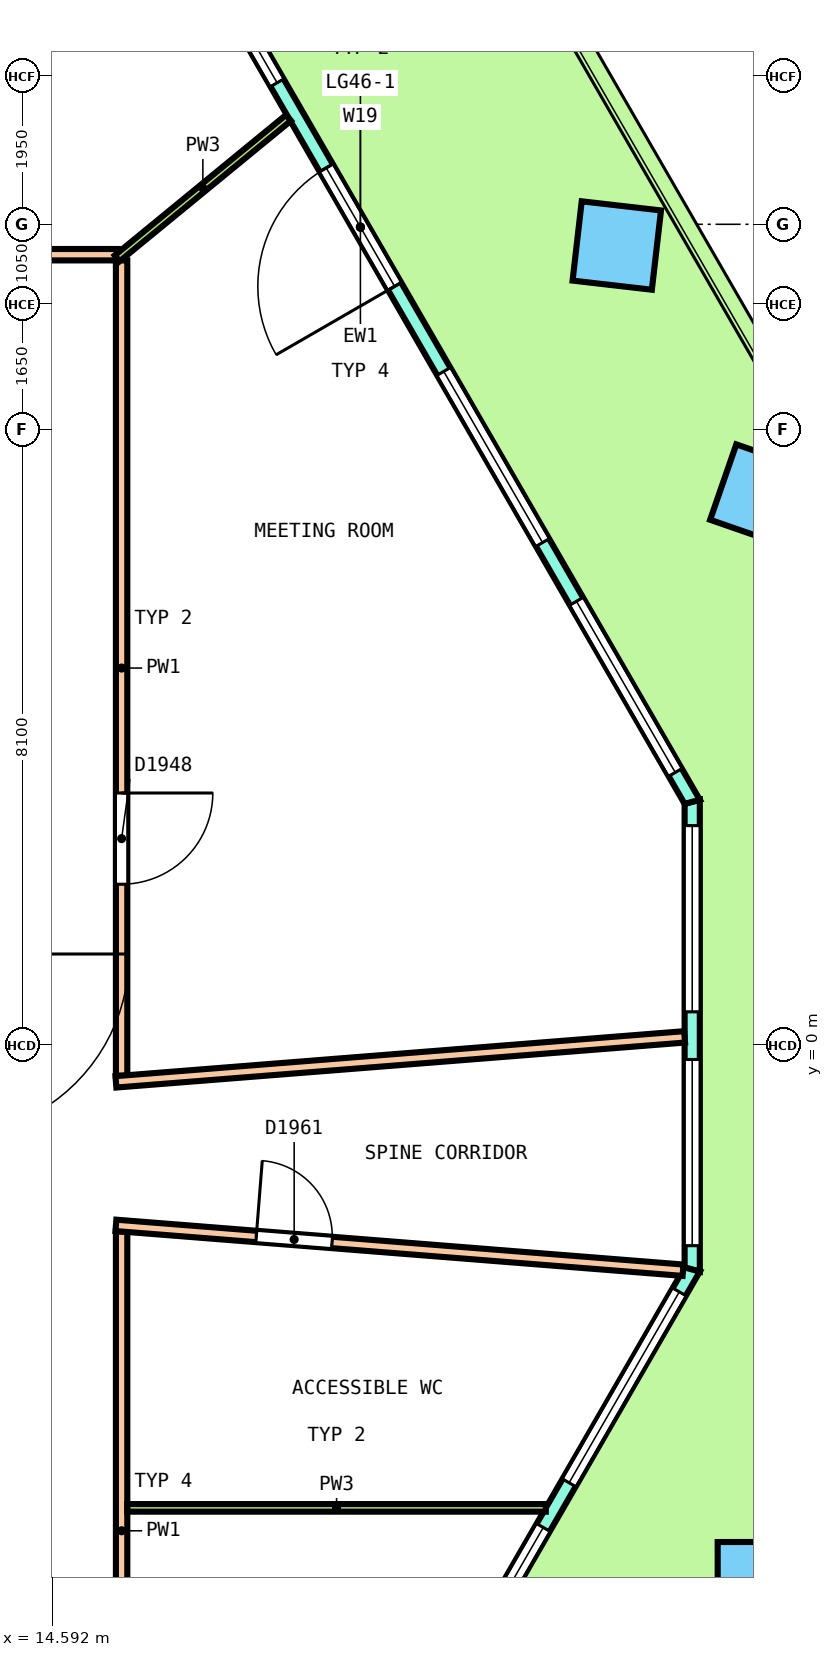
"""IFC4 building model, lengths in metres.
Left out: names, types, materials, properties, quantities, classifications, styles, units other than length and angle.
Written with IfcOpenShell. Run it as: python <this file> out.ifc"""

import sys

from ifc_helpers import new_model, si_unit, direction, frame, frame_2d, origin, origin_2d, place, context, subcontext, project, spatial, polyline, rectangle, outline, extrude, element, fill, save


model = new_model("IFC4")
c1 = context("Model", 3, precision=1e-05, world=origin(), true_north=direction((0.0, 1.0)))
c2 = subcontext(c1, "Body", "Model", "MODEL_VIEW")
j1 = project(units=[si_unit("LENGTHUNIT", "METRE"), si_unit("PLANEANGLEUNIT", "RADIAN")], contexts=[c1])
p1 = place(None, origin())
s1 = spatial("IfcSite", under=j1, at=p1, CompositionType="ELEMENT")
p2 = place(p1, origin())
s2 = spatial("IfcBuilding", under=s1, at=p2, CompositionType="ELEMENT")
p3 = place(p2, frame((0.0, 0.0, 215.4)))
s3 = spatial("IfcBuildingStorey", under=s2, at=p3, CompositionType="ELEMENT", Elevation=215.4)
p4 = place(p3, frame((23.911, 7.237, 0.0), z_axis=(0.021725676399, 0.025134936388, 0.999447962606), x_axis=(-0.500488924466, 0.86567442941, -0.010891223664)))
e1 = element("IfcColumn", 1, at=p4, inside=s3, PredefinedType="COLUMN", context=c2, shape_type="SweptSolid", body=[
    extrude(rectangle(XDim=1.05, YDim=1.05, at=origin_2d()), origin(), (0.0, 0.0, 1.0), 3.652),
])
p5 = place(p3, frame((22.015, 10.521, 0.0), z_axis=(0.025403639223, 0.018852174371, 0.999499500068), x_axis=(-0.500083888167, 0.865969385556, -0.003623268626)))
e2 = element("IfcColumn", 2, at=p5, inside=s3, PredefinedType="COLUMN", context=c2, shape_type="SweptSolid", body=[
    extrude(rectangle(XDim=1.05, YDim=1.05, at=origin_2d()), origin(), (0.0, 0.0, 1.0), 3.652),
])
p6 = place(p3, frame((23.867, -7.061, 0.0), z_axis=(0.010899694483, 0.018857140148, 0.999762774325), x_axis=(0.499728940012, 0.865907957958, -0.021780607409)))
e3 = element("IfcColumn", 3, at=p6, inside=s3, PredefinedType="COLUMN", context=c2, shape_type="SweptSolid", body=[
    extrude(rectangle(XDim=1.05, YDim=1.05, at=origin_2d()), origin(), (0.0, 0.0, 1.0), 3.651),
])
p7 = place(p3, frame((23.007, -2.951, 0.0), z_axis=(0.0, 0.0, 1.0), x_axis=(0.0, 1.0, 0.0)))
e4 = element("IfcWall", 4, at=p7, inside=s3, PredefinedType="SOLIDWALL", context=c2, shape_type="SweptSolid", body=[
    extrude(outline(polyline([(-0.027, -0.1), (1.008, -0.1), (2.042, -0.1), (3.076, -0.1), (4.111, -0.1), (5.145, -0.1), (6.18, -0.1), (6.126, 0.1), (5.109, 0.1), (4.093, 0.1), (3.076, 0.1), (2.06, 0.1), (1.043, 0.1), (0.027, 0.1), (-0.027, -0.1)])), origin(), (0.0, 0.0, 1.0), 3.7),
])
p8 = place(p7, frame((0.313, 0.0, 0.1)))
e5 = element("IfcOpeningElement", 5, at=p8, cuts=e4, PredefinedType="OPENING", context=c2, shape_type="SweptSolid", body=[
    extrude(rectangle(XDim=2.45, YDim=2.65, at=frame_2d((1.225, 1.325))), frame((0.0, 0.11, 0.0), z_axis=(0.0, -1.0, 0.0), x_axis=(1.0, 0.0, 0.0)), (0.0, 0.0, 1.0), 0.22),
])
p9 = place(p7, frame((3.39, 0.0, 0.1)))
e6 = element("IfcOpeningElement", 6, at=p9, cuts=e4, PredefinedType="OPENING", context=c2, shape_type="SweptSolid", body=[
    extrude(rectangle(XDim=2.45, YDim=2.65, at=frame_2d((1.225, 1.325))), frame((0.0, 0.11, 0.0), z_axis=(0.0, -1.0, 0.0), x_axis=(1.0, 0.0, 0.0)), (0.0, 0.0, 1.0), 0.22),
])
p10 = place(p3, frame((23.007, 3.202, 0.0), z_axis=(0.0, 0.0, 1.0), x_axis=(-0.500006883229, 0.866021429714, 0.0)))
e7 = element("IfcWall", 7, at=p10, inside=s3, PredefinedType="SOLIDWALL", context=c2, shape_type="SweptSolid", body=[
    extrude(outline(polyline([(-0.027, -0.1), (1.003, -0.1), (2.034, -0.1), (3.064, -0.1), (4.094, -0.1), (5.125, -0.1), (6.155, -0.1), (7.185, -0.1), (8.215, -0.1), (9.245, -0.1), (10.276, -0.1), (11.306, -0.1), (12.336, -0.1), (13.366, -0.1), (14.397, -0.1), (15.427, -0.1), (16.457, -0.1), (17.488, -0.1), (17.434, 0.1), (16.41, 0.1), (15.386, 0.1), (14.362, 0.1), (13.338, 0.1), (12.314, 0.1), (11.29, 0.1), (10.266, 0.1), (9.242, 0.1), (8.218, 0.1), (7.194, 0.1), (6.17, 0.1), (5.146, 0.1), (4.123, 0.1), (3.099, 0.1), (2.075, 0.1), (1.051, 0.1), (0.027, 0.1), (-0.027, -0.1)])), origin(), (0.0, 0.0, 1.0), 3.7),
])
p11 = place(p10, frame((0.446, 0.0, 0.1)))
e8 = element("IfcOpeningElement", 8, at=p11, cuts=e7, PredefinedType="OPENING", context=c2, shape_type="SweptSolid", body=[
    extrude(rectangle(XDim=2.6, YDim=2.65, at=frame_2d((1.3, 1.325))), frame((0.0, 0.11, 0.0), z_axis=(0.0, -1.0, 0.0), x_axis=(1.0, 0.0, 0.0)), (0.0, 0.0, 1.0), 0.22),
])
p12 = place(p10, frame((3.938, 0.0, 0.1)))
e9 = element("IfcOpeningElement", 9, at=p12, cuts=e7, PredefinedType="OPENING", context=c2, shape_type="SweptSolid", body=[
    extrude(rectangle(XDim=2.6, YDim=2.65, at=frame_2d((1.3, 1.325))), frame((0.0, 0.11, 0.0), z_axis=(0.0, -1.0, 0.0), x_axis=(1.0, 0.0, 0.0)), (0.0, 0.0, 1.0), 0.22),
])
p13 = place(p10, frame((7.83, 0.0, 0.0)))
e10 = element("IfcOpeningElement", 10, at=p13, cuts=e7, PredefinedType="OPENING", context=c2, shape_type="SweptSolid", body=[
    extrude(rectangle(XDim=1.8, YDim=2.4, at=frame_2d((0.9, 1.2))), frame((0.0, 0.11, 0.0), z_axis=(0.0, -1.0, 0.0), x_axis=(1.0, 0.0, 0.0)), (0.0, 0.0, 1.0), 0.22),
])
p14 = place(p10, frame((7.83, 0.0, 2.55)))
e11 = element("IfcOpeningElement", 11, at=p14, cuts=e7, PredefinedType="OPENING", context=c2, shape_type="SweptSolid", body=[
    extrude(rectangle(XDim=1.8, YDim=0.2, at=frame_2d((0.9, 0.1))), frame((0.0, 0.11, 0.0), z_axis=(0.0, -1.0, 0.0), x_axis=(1.0, 0.0, 0.0)), (0.0, 0.0, 1.0), 0.22),
])
p15 = place(p10, frame((10.923, 0.0, 0.1)))
e12 = element("IfcOpeningElement", 12, at=p15, cuts=e7, PredefinedType="OPENING", context=c2, shape_type="SweptSolid", body=[
    extrude(rectangle(XDim=2.6, YDim=2.65, at=frame_2d((1.3, 1.325))), frame((0.0, 0.11, 0.0), z_axis=(0.0, -1.0, 0.0), x_axis=(1.0, 0.0, 0.0)), (0.0, 0.0, 1.0), 0.22),
])
p16 = place(p10, frame((14.415, 0.0, 0.1)))
e13 = element("IfcOpeningElement", 13, at=p16, cuts=e7, PredefinedType="OPENING", context=c2, shape_type="SweptSolid", body=[
    extrude(rectangle(XDim=2.6, YDim=2.65, at=frame_2d((1.3, 1.325))), frame((0.0, 0.11, 0.0), z_axis=(0.0, -1.0, 0.0), x_axis=(1.0, 0.0, 0.0)), (0.0, 0.0, 1.0), 0.22),
])
p17 = place(p3, frame((14.059, -18.449, 0.0), z_axis=(0.0, 0.0, 1.0), x_axis=(0.500006652623, 0.866021562857, 0.0)))
e14 = element("IfcWall", 14, at=p17, inside=s3, PredefinedType="SOLIDWALL", context=c2, shape_type="SweptSolid", body=[
    extrude(outline(polyline([(-0.027, -0.1), (1.029, -0.1), (2.085, -0.1), (3.141, -0.1), (4.197, -0.1), (5.252, -0.1), (6.308, -0.1), (7.364, -0.1), (8.42, -0.1), (9.476, -0.1), (10.532, -0.1), (11.588, -0.1), (12.644, -0.1), (13.699, -0.1), (14.755, -0.1), (15.811, -0.1), (16.867, -0.1), (17.923, -0.1), (17.869, 0.1), (16.82, 0.1), (15.77, 0.1), (14.721, 0.1), (13.671, 0.1), (12.622, 0.1), (11.572, 0.1), (10.522, 0.1), (9.473, 0.1), (8.423, 0.1), (7.374, 0.1), (6.324, 0.1), (5.275, 0.1), (4.225, 0.1), (3.176, 0.1), (2.126, 0.1), (1.076, 0.1), (0.027, 0.1), (-0.027, -0.1)])), origin(), (0.0, 0.0, 1.0), 3.7),
])
p18 = place(p17, frame((0.34, 0.0, 0.1)))
e15 = element("IfcOpeningElement", 15, at=p18, cuts=e14, PredefinedType="OPENING", context=c2, shape_type="SweptSolid", body=[
    extrude(rectangle(XDim=2.9, YDim=2.65, at=frame_2d((1.45, 1.325))), frame((0.0, 0.11, 0.0), z_axis=(0.0, -1.0, 0.0), x_axis=(1.0, 0.0, 0.0)), (0.0, 0.0, 1.0), 0.22),
])
p19 = place(p17, frame((3.919, 0.0, 0.1)))
e16 = element("IfcOpeningElement", 16, at=p19, cuts=e14, PredefinedType="OPENING", context=c2, shape_type="SweptSolid", body=[
    extrude(rectangle(XDim=2.9, YDim=2.65, at=frame_2d((1.45, 1.325))), frame((0.0, 0.11, 0.0), z_axis=(0.0, -1.0, 0.0), x_axis=(1.0, 0.0, 0.0)), (0.0, 0.0, 1.0), 0.22),
])
p20 = place(p17, frame((8.048, 0.0, 0.0)))
e17 = element("IfcOpeningElement", 17, at=p20, cuts=e14, PredefinedType="OPENING", context=c2, shape_type="SweptSolid", body=[
    extrude(rectangle(XDim=1.8, YDim=2.4, at=frame_2d((0.9, 1.2))), frame((0.0, 0.11, 0.0), z_axis=(0.0, -1.0, 0.0), x_axis=(1.0, 0.0, 0.0)), (0.0, 0.0, 1.0), 0.22),
])
p21 = place(p17, frame((8.048, 0.0, 2.55)))
e18 = element("IfcOpeningElement", 18, at=p21, cuts=e14, PredefinedType="OPENING", context=c2, shape_type="SweptSolid", body=[
    extrude(rectangle(XDim=1.8, YDim=0.2, at=frame_2d((0.9, 0.1))), frame((0.0, 0.11, 0.0), z_axis=(0.0, -1.0, 0.0), x_axis=(1.0, 0.0, 0.0)), (0.0, 0.0, 1.0), 0.22),
])
p22 = place(p17, frame((11.077, 0.0, 0.1)))
e19 = element("IfcOpeningElement", 19, at=p22, cuts=e14, PredefinedType="OPENING", context=c2, shape_type="SweptSolid", body=[
    extrude(rectangle(XDim=2.9, YDim=2.65, at=frame_2d((1.45, 1.325))), frame((0.0, 0.11, 0.0), z_axis=(0.0, -1.0, 0.0), x_axis=(1.0, 0.0, 0.0)), (0.0, 0.0, 1.0), 0.22),
])
p23 = place(p17, frame((14.656, 0.0, 0.1)))
e20 = element("IfcOpeningElement", 20, at=p23, cuts=e14, PredefinedType="OPENING", context=c2, shape_type="SweptSolid", body=[
    extrude(rectangle(XDim=2.9, YDim=2.65, at=frame_2d((1.45, 1.325))), frame((0.0, 0.11, 0.0), z_axis=(0.0, -1.0, 0.0), x_axis=(1.0, 0.0, 0.0)), (0.0, 0.0, 1.0), 0.22),
])
p24 = place(p3, frame((15.5, -10.325, 0.0), z_axis=(0.0, 0.0, 1.0), x_axis=(0.0, 1.0, 0.0)))
e21 = element("IfcWall", 21, at=p24, inside=s3, PredefinedType="PARTITIONING", context=c2, shape_type="SweptSolid", body=[
    extrude(rectangle(XDim=7.874, YDim=0.15, at=frame_2d((3.937, 0.0))), origin(), (0.0, 0.0, 1.0), 2.8),
])
p25 = place(p24, frame((1.19, 0.0, 0.0)))
e22 = element("IfcOpeningElement", 22, at=p25, cuts=e21, PredefinedType="OPENING", context=c2, shape_type="SweptSolid", body=[
    extrude(rectangle(XDim=1.0, YDim=2.1, at=frame_2d((0.5, 1.05))), frame((0.0, 0.085, 0.0), z_axis=(0.0, -1.0, 0.0), x_axis=(1.0, 0.0, 0.0)), (0.0, 0.0, 1.0), 0.17),
])
p26 = place(p3, frame((15.5, -0.401, 0.0), z_axis=(0.0, 0.0, 1.0), x_axis=(0.0, 1.0, 0.0)))
e23 = element("IfcWall", 23, at=p26, inside=s3, PredefinedType="PARTITIONING", context=c2, shape_type="SweptSolid", body=[
    extrude(rectangle(XDim=10.726, YDim=0.15, at=frame_2d((5.363, 0.0))), origin(), (0.0, 0.0, 1.0), 2.8),
])
p27 = place(p26, frame((2.519, 0.0, 0.0)))
e24 = element("IfcOpeningElement", 24, at=p27, cuts=e23, PredefinedType="OPENING", context=c2, shape_type="SweptSolid", body=[
    extrude(rectangle(XDim=1.2, YDim=2.1, at=frame_2d((0.6, 1.05))), frame((0.0, 0.085, 0.0), z_axis=(0.0, -1.0, 0.0), x_axis=(1.0, 0.0, 0.0)), (0.0, 0.0, 1.0), 0.17),
])
p28 = place(p3, frame((-15.425, 10.4, 0.0), z_axis=(0.0, 0.0, 1.0), x_axis=(1.0, 0.0, 0.0)))
e25 = element("IfcWall", 25, at=p28, inside=s3, PredefinedType="PARTITIONING", context=c2, shape_type="SweptSolid", body=[
    extrude(rectangle(XDim=30.875, YDim=0.15, at=frame_2d((15.438, 0.0))), origin(), (0.0, 0.0, 1.0), 2.8),
])
p29 = place(p28, frame((20.234, 0.0, 0.0)))
e26 = element("IfcOpeningElement", 26, at=p29, cuts=e25, PredefinedType="OPENING", context=c2, shape_type="SweptSolid", body=[
    extrude(rectangle(XDim=1.2, YDim=2.1, at=frame_2d((0.6, 1.05))), frame((0.0, 0.085, 0.0), z_axis=(0.0, -1.0, 0.0), x_axis=(1.0, 0.0, 0.0)), (0.0, 0.0, 1.0), 0.17),
])
p30 = place(p28, frame((11.235, 0.0, 0.0)))
e27 = element("IfcOpeningElement", 27, at=p30, cuts=e25, PredefinedType="OPENING", context=c2, shape_type="SweptSolid", body=[
    extrude(rectangle(XDim=1.2, YDim=2.1, at=frame_2d((0.6, 1.05))), frame((0.0, 0.085, 0.0), z_axis=(0.0, -1.0, 0.0), x_axis=(1.0, 0.0, 0.0)), (0.0, 0.0, 1.0), 0.17),
])
p31 = place(p28, frame((3.281, 0.0, 0.0)))
e28 = element("IfcOpeningElement", 28, at=p31, cuts=e25, PredefinedType="OPENING", context=c2, shape_type="SweptSolid", body=[
    extrude(rectangle(XDim=1.2, YDim=2.1, at=frame_2d((0.6, 1.05))), frame((0.0, 0.085, 0.0), z_axis=(0.0, -1.0, 0.0), x_axis=(1.0, 0.0, 0.0)), (0.0, 0.0, 1.0), 0.17),
])
p32 = place(p3, frame((15.425, -0.482, 0.0), z_axis=(0.0, 0.0, 1.0), x_axis=(0.996888805711, 0.078820739965, 0.0)))
e29 = element("IfcWall", 29, at=p32, inside=s3, PredefinedType="PARTITIONING", context=c2, shape_type="SweptSolid", body=[
    extrude(rectangle(XDim=7.505, YDim=0.15, at=frame_2d((3.752, 0.0))), origin(), (0.0, 0.0, 1.0), 2.8),
])
p33 = place(p3, frame((15.425, -2.37, 0.0), z_axis=(0.0, 0.0, 1.0), x_axis=(0.996886755429, -0.078846666706, 0.0)))
e30 = element("IfcWall", 30, at=p33, inside=s3, PredefinedType="PARTITIONING", context=c2, shape_type="SweptSolid", body=[
    extrude(rectangle(XDim=7.484, YDim=0.15, at=frame_2d((3.742, 0.0))), origin(), (0.0, 0.0, 1.0), 2.8),
])
p34 = place(p33, frame((1.852, 0.0, 0.0)))
e31 = element("IfcOpeningElement", 31, at=p34, cuts=e30, PredefinedType="OPENING", context=c2, shape_type="SweptSolid", body=[
    extrude(rectangle(XDim=1.0, YDim=2.1, at=frame_2d((0.5, 1.05))), frame((0.0, 0.085, 0.0), z_axis=(0.0, -1.0, 0.0), x_axis=(1.0, 0.0, 0.0)), (0.0, 0.0, 1.0), 0.17),
])
p35 = place(p3, frame((15.442, 10.352, 0.0), z_axis=(0.0, 0.0, 1.0), x_axis=(0.773188128528, 0.634176724504, 0.0)))
e32 = element("IfcWall", 32, at=p35, inside=s3, PredefinedType="PARTITIONING", context=c2, shape_type="SweptSolid", body=[
    extrude(rectangle(XDim=2.915, YDim=0.1, at=frame_2d((1.458, 0.0))), origin(), (0.0, 0.0, 1.0), 2.8),
])
p36 = place(p3, frame((15.575, -6.086, 0.0), z_axis=(0.0, 0.0, 1.0), x_axis=(1.0, 0.0, 0.0)))
e33 = element("IfcWall", 33, at=p36, inside=s3, PredefinedType="PARTITIONING", context=c2, shape_type="SweptSolid", body=[
    extrude(rectangle(XDim=5.506, YDim=0.1, at=frame_2d((2.753, 0.0))), origin(), (0.0, 0.0, 1.0), 2.8),
])
p37 = place(p8, origin())
e34 = element("IfcWindow", 34, at=p37, inside=s3, PartitioningType="SINGLE_PANEL", PredefinedType="WINDOW", context=c2, shape_type="SweptSolid", body=[
    extrude(rectangle(XDim=2.45, YDim=2.65, at=frame_2d((1.225, 1.325))), frame((0.0, 0.03, 0.0), z_axis=(0.0, -1.0, 0.0), x_axis=(1.0, 0.0, 0.0)), (0.0, 0.0, 1.0), 0.06),
])
fill(e5, e34)
p38 = place(p9, origin())
e35 = element("IfcWindow", 35, at=p38, inside=s3, PartitioningType="SINGLE_PANEL", PredefinedType="WINDOW", context=c2, shape_type="SweptSolid", body=[
    extrude(rectangle(XDim=2.45, YDim=2.65, at=frame_2d((1.225, 1.325))), frame((0.0, 0.03, 0.0), z_axis=(0.0, -1.0, 0.0), x_axis=(1.0, 0.0, 0.0)), (0.0, 0.0, 1.0), 0.06),
])
fill(e6, e35)
p39 = place(p11, origin())
e36 = element("IfcWindow", 36, at=p39, inside=s3, PartitioningType="SINGLE_PANEL", PredefinedType="WINDOW", context=c2, shape_type="SweptSolid", body=[
    extrude(rectangle(XDim=2.6, YDim=2.65, at=frame_2d((1.3, 1.325))), frame((0.0, 0.03, 0.0), z_axis=(0.0, -1.0, 0.0), x_axis=(1.0, 0.0, 0.0)), (0.0, 0.0, 1.0), 0.06),
])
fill(e8, e36)
p40 = place(p12, origin())
e37 = element("IfcWindow", 37, at=p40, inside=s3, PartitioningType="SINGLE_PANEL", PredefinedType="WINDOW", context=c2, shape_type="SweptSolid", body=[
    extrude(rectangle(XDim=2.6, YDim=2.65, at=frame_2d((1.3, 1.325))), frame((0.0, 0.03, 0.0), z_axis=(0.0, -1.0, 0.0), x_axis=(1.0, 0.0, 0.0)), (0.0, 0.0, 1.0), 0.06),
])
fill(e9, e37)
p41 = place(p13, origin())
e38 = element("IfcDoor", 38, at=p41, inside=s3, OperationType="DOUBLE_DOOR_SINGLE_SWING", PredefinedType="DOOR", context=c2, shape_type="SweptSolid", body=[
    extrude(rectangle(XDim=1.8, YDim=2.4, at=frame_2d((0.9, 1.2))), frame((0.0, 0.025, 0.0), z_axis=(0.0, -1.0, 0.0), x_axis=(1.0, 0.0, 0.0)), (0.0, 0.0, 1.0), 0.05),
])
fill(e10, e38)
p42 = place(p14, origin())
e39 = element("IfcWindow", 39, at=p42, inside=s3, PartitioningType="SINGLE_PANEL", PredefinedType="WINDOW", context=c2, shape_type="SweptSolid", body=[
    extrude(rectangle(XDim=1.8, YDim=0.2, at=frame_2d((0.9, 0.1))), frame((0.0, 0.03, 0.0), z_axis=(0.0, -1.0, 0.0), x_axis=(1.0, 0.0, 0.0)), (0.0, 0.0, 1.0), 0.06),
])
fill(e11, e39)
p43 = place(p15, origin())
e40 = element("IfcWindow", 40, at=p43, inside=s3, PartitioningType="SINGLE_PANEL", PredefinedType="WINDOW", context=c2, shape_type="SweptSolid", body=[
    extrude(rectangle(XDim=2.6, YDim=2.65, at=frame_2d((1.3, 1.325))), frame((0.0, 0.03, 0.0), z_axis=(0.0, -1.0, 0.0), x_axis=(1.0, 0.0, 0.0)), (0.0, 0.0, 1.0), 0.06),
])
fill(e12, e40)
p44 = place(p22, origin())
e41 = element("IfcWindow", 41, at=p44, inside=s3, PartitioningType="SINGLE_PANEL", PredefinedType="WINDOW", context=c2, shape_type="SweptSolid", body=[
    extrude(rectangle(XDim=2.9, YDim=2.65, at=frame_2d((1.45, 1.325))), frame((0.0, 0.03, 0.0), z_axis=(0.0, -1.0, 0.0), x_axis=(1.0, 0.0, 0.0)), (0.0, 0.0, 1.0), 0.06),
])
fill(e19, e41)
p45 = place(p23, origin())
e42 = element("IfcWindow", 42, at=p45, inside=s3, PartitioningType="SINGLE_PANEL", PredefinedType="WINDOW", context=c2, shape_type="SweptSolid", body=[
    extrude(rectangle(XDim=2.9, YDim=2.65, at=frame_2d((1.45, 1.325))), frame((0.0, 0.03, 0.0), z_axis=(0.0, -1.0, 0.0), x_axis=(1.0, 0.0, 0.0)), (0.0, 0.0, 1.0), 0.06),
])
fill(e20, e42)
p46 = place(p27, origin())
e43 = element("IfcDoor", 43, at=p46, inside=s3, OperationType="DOUBLE_DOOR_SINGLE_SWING", PredefinedType="DOOR", context=c2, shape_type="SweptSolid", body=[
    extrude(rectangle(XDim=1.2, YDim=2.1, at=frame_2d((0.6, 1.05))), frame((0.0, 0.025, 0.0), z_axis=(0.0, -1.0, 0.0), x_axis=(1.0, 0.0, 0.0)), (0.0, 0.0, 1.0), 0.05),
])
fill(e24, e43)
p47 = place(p34, origin())
e44 = element("IfcDoor", 44, at=p47, inside=s3, OperationType="SINGLE_SWING_RIGHT", PredefinedType="DOOR", context=c2, shape_type="SweptSolid", body=[
    extrude(rectangle(XDim=1.0, YDim=2.1, at=frame_2d((0.5, 1.05))), frame((0.0, 0.025, 0.0), z_axis=(0.0, -1.0, 0.0), x_axis=(1.0, 0.0, 0.0)), (0.0, 0.0, 1.0), 0.05),
])
fill(e31, e44)
save(model, sys.argv[1])
